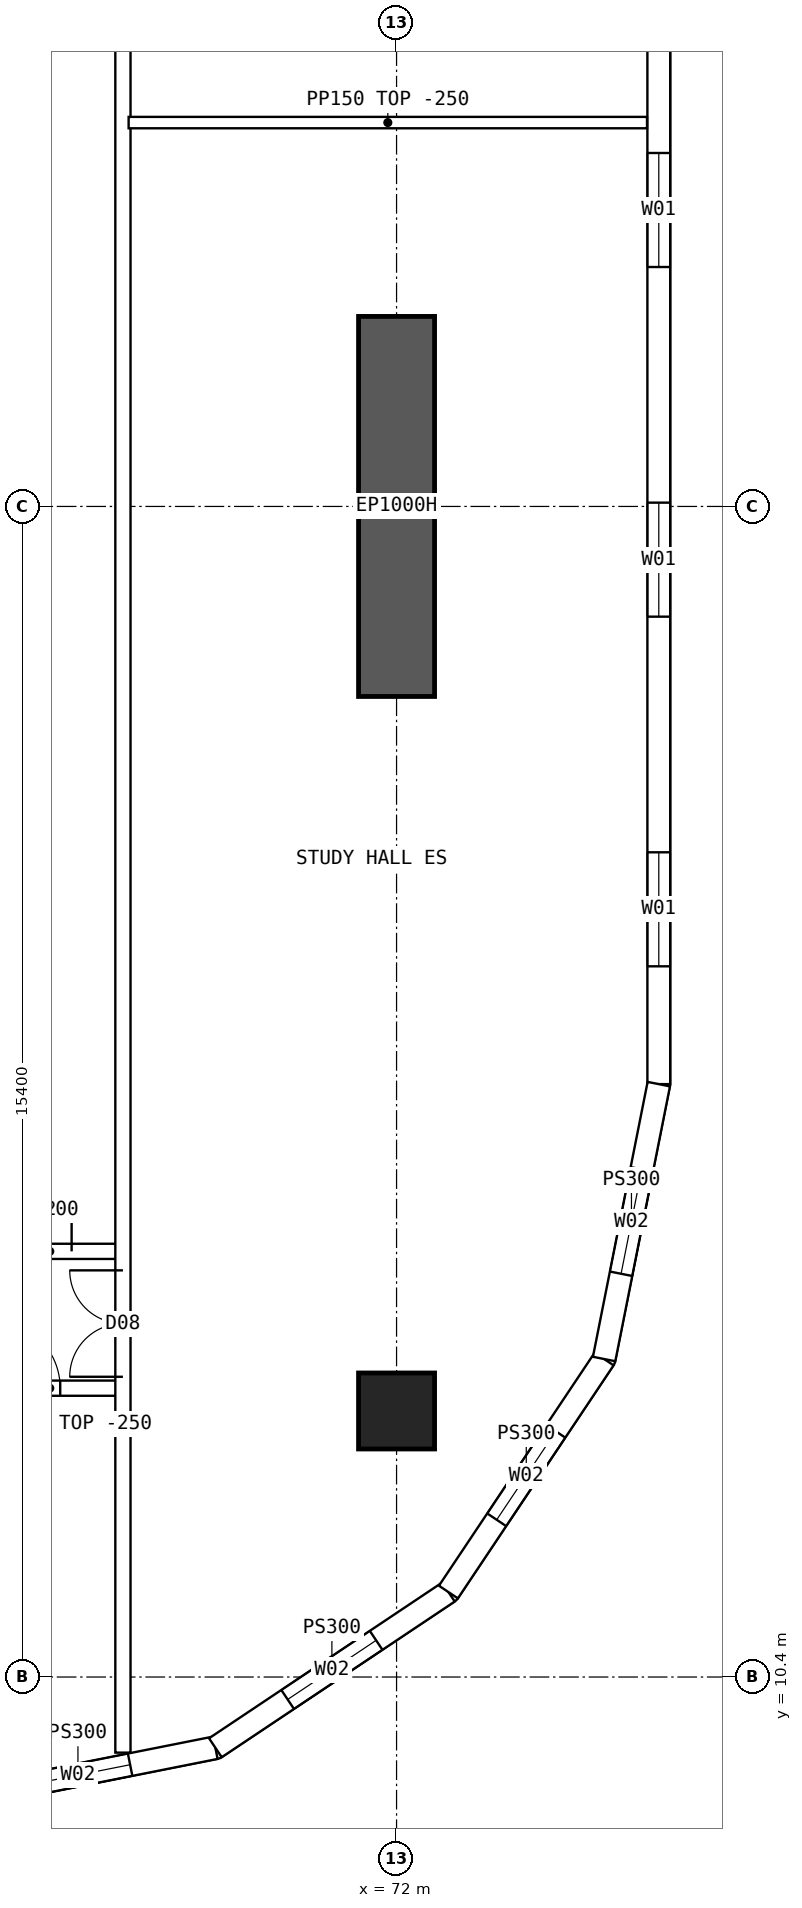
"""IFC4 building model, lengths in metres.
Left out: names, types, materials, properties, quantities, classifications, styles, units other than length and angle.
Written with IfcOpenShell. Run it as: python <this file> out.ifc"""

import sys

from ifc_helpers import new_model, si_unit, direction, frame, frame_2d, origin, origin_2d, place, context, subcontext, project, spatial, polyline, rectangle, hollow_rectangle, outline, extrude, element, fill, save


model = new_model("IFC4")
c1 = context("Model", 3, precision=1e-05, world=origin(), true_north=direction((0.0, 1.0)))
c2 = subcontext(c1, "Body", "Model", "MODEL_VIEW")
j1 = project(units=[si_unit("LENGTHUNIT", "METRE"), si_unit("PLANEANGLEUNIT", "RADIAN")], contexts=[c1])
p1 = place(None, origin())
s1 = spatial("IfcSite", under=j1, at=p1, CompositionType="ELEMENT")
p2 = place(p1, origin())
s2 = spatial("IfcBuilding", under=s1, at=p2, CompositionType="ELEMENT")
p3 = place(p2, frame((0.0, 0.0, 88.15)))
s3 = spatial("IfcBuildingStorey", under=s2, at=p3, CompositionType="ELEMENT", Elevation=88.15)
p4 = place(p3, frame((72.0, 13.9, 0.0), z_axis=(0.0, 0.0, 1.0), x_axis=(1.0, 0.0, 0.0)))
e1 = element("IfcColumn", 1, at=p4, inside=s3, PredefinedType="COLUMN", context=c2, shape_type="SweptSolid", body=[
    extrude(hollow_rectangle(XDim=1.0, YDim=1.0, WallThickness=0.1, at=origin_2d()), origin(), (0.0, 0.0, 1.0), 3.75),
])
p5 = place(p3, frame((72.0, 23.3, 0.0), z_axis=(0.0, 0.0, 1.0), x_axis=(0.0, 1.0, 0.0)))
e2 = element("IfcWall", 2, at=p5, inside=s3, PredefinedType="SHEAR", context=c2, shape_type="SweptSolid", body=[
    extrude(rectangle(XDim=5.0, YDim=1.0, at=frame_2d((2.5, 0.0))), origin(), (0.0, 0.0, 1.0), 3.75),
])
p6 = place(p3, frame((75.45, 18.2, 0.0), z_axis=(0.0, 0.0, 1.0), x_axis=(0.0, 1.0, 0.0)))
e3 = element("IfcWall", 3, at=p6, inside=s3, PredefinedType="SOLIDWALL", context=c2, shape_type="SweptSolid", body=[
    extrude(outline(polyline([(-0.015, -0.15), (27.615, -0.15), (27.585, 0.15), (0.015, 0.15), (-0.015, -0.15)])), origin(), (0.0, 0.0, 1.0), 3.5),
])
p7 = place(p6, frame((1.55, 0.0, 0.9)))
e4 = element("IfcOpeningElement", 4, at=p7, cuts=e3, PredefinedType="OPENING", context=c2, shape_type="SweptSolid", body=[
    extrude(rectangle(XDim=1.5, YDim=2.0, at=frame_2d((0.75, 1.0))), frame((0.0, 0.16, 0.0), z_axis=(0.0, -1.0, 0.0), x_axis=(1.0, 0.0, 0.0)), (0.0, 0.0, 1.0), 0.32),
])
p8 = place(p6, frame((6.15, 0.0, 0.9)))
e5 = element("IfcOpeningElement", 5, at=p8, cuts=e3, PredefinedType="OPENING", context=c2, shape_type="SweptSolid", body=[
    extrude(rectangle(XDim=1.5, YDim=2.0, at=frame_2d((0.75, 1.0))), frame((0.0, 0.16, 0.0), z_axis=(0.0, -1.0, 0.0), x_axis=(1.0, 0.0, 0.0)), (0.0, 0.0, 1.0), 0.32),
])
p9 = place(p6, frame((10.75, 0.0, 0.9)))
e6 = element("IfcOpeningElement", 6, at=p9, cuts=e3, PredefinedType="OPENING", context=c2, shape_type="SweptSolid", body=[
    extrude(rectangle(XDim=1.5, YDim=2.0, at=frame_2d((0.75, 1.0))), frame((0.0, 0.16, 0.0), z_axis=(0.0, -1.0, 0.0), x_axis=(1.0, 0.0, 0.0)), (0.0, 0.0, 1.0), 0.32),
])
p10 = place(p6, frame((15.35, 0.0, 0.9)))
e7 = element("IfcOpeningElement", 7, at=p10, cuts=e3, PredefinedType="OPENING", context=c2, shape_type="SweptSolid", body=[
    extrude(rectangle(XDim=1.5, YDim=2.0, at=frame_2d((0.75, 1.0))), frame((0.0, 0.16, 0.0), z_axis=(0.0, -1.0, 0.0), x_axis=(1.0, 0.0, 0.0)), (0.0, 0.0, 1.0), 0.32),
])
p11 = place(p6, frame((19.95, 0.0, 0.9)))
e8 = element("IfcOpeningElement", 8, at=p11, cuts=e3, PredefinedType="OPENING", context=c2, shape_type="SweptSolid", body=[
    extrude(rectangle(XDim=1.5, YDim=2.0, at=frame_2d((0.75, 1.0))), frame((0.0, 0.16, 0.0), z_axis=(0.0, -1.0, 0.0), x_axis=(1.0, 0.0, 0.0)), (0.0, 0.0, 1.0), 0.32),
])
p12 = place(p6, frame((24.55, 0.0, 0.9)))
e9 = element("IfcOpeningElement", 9, at=p12, cuts=e3, PredefinedType="OPENING", context=c2, shape_type="SweptSolid", body=[
    extrude(rectangle(XDim=1.5, YDim=2.0, at=frame_2d((0.75, 1.0))), frame((0.0, 0.16, 0.0), z_axis=(0.0, -1.0, 0.0), x_axis=(1.0, 0.0, 0.0)), (0.0, 0.0, 1.0), 0.32),
])
p13 = place(p3, frame((66.0, 8.75, 0.0), z_axis=(0.0, 0.0, 1.0), x_axis=(0.980791473772, 0.195059183267, 0.0)))
e10 = element("IfcWall", 10, at=p13, inside=s3, PredefinedType="SOLIDWALL", context=c2, shape_type="SweptSolid", body=[
    extrude(outline(polyline([(-0.03, -0.15), (3.717, -0.15), (3.657, 0.15), (0.03, 0.15), (-0.03, -0.15)])), origin(), (0.0, 0.0, 1.0), 3.5),
])
p14 = place(p13, frame((1.144, 0.0, 0.9)))
e11 = element("IfcOpeningElement", 11, at=p14, cuts=e10, PredefinedType="OPENING", context=c2, shape_type="SweptSolid", body=[
    extrude(rectangle(XDim=1.4, YDim=1.8, at=frame_2d((0.7, 0.9))), frame((0.0, 0.16, 0.0), z_axis=(0.0, -1.0, 0.0), x_axis=(1.0, 0.0, 0.0)), (0.0, 0.0, 1.0), 0.32),
])
p15 = place(p3, frame((69.616, 9.469, 0.0), z_axis=(0.0, 0.0, 1.0), x_axis=(0.831448786846, 0.555601399253, 0.0)))
e12 = element("IfcWall", 12, at=p15, inside=s3, PredefinedType="SOLIDWALL", context=c2, shape_type="SweptSolid", body=[
    extrude(outline(polyline([(-0.03, -0.15), (3.717, -0.15), (3.657, 0.15), (0.03, 0.15), (-0.03, -0.15)])), origin(), (0.0, 0.0, 1.0), 3.5),
])
p16 = place(p15, frame((1.144, 0.0, 0.9)))
e13 = element("IfcOpeningElement", 13, at=p16, cuts=e12, PredefinedType="OPENING", context=c2, shape_type="SweptSolid", body=[
    extrude(rectangle(XDim=1.4, YDim=1.8, at=frame_2d((0.7, 0.9))), frame((0.0, 0.16, 0.0), z_axis=(0.0, -1.0, 0.0), x_axis=(1.0, 0.0, 0.0)), (0.0, 0.0, 1.0), 0.32),
])
p17 = place(p3, frame((72.682, 11.518, 0.0), z_axis=(0.0, 0.0, 1.0), x_axis=(0.555601399253, 0.831448786846, 0.0)))
e14 = element("IfcWall", 14, at=p17, inside=s3, PredefinedType="SOLIDWALL", context=c2, shape_type="SweptSolid", body=[
    extrude(outline(polyline([(-0.03, -0.15), (3.717, -0.15), (3.657, 0.15), (0.03, 0.15), (-0.03, -0.15)])), origin(), (0.0, 0.0, 1.0), 3.5),
])
p18 = place(p17, frame((1.144, 0.0, 0.9)))
e15 = element("IfcOpeningElement", 15, at=p18, cuts=e14, PredefinedType="OPENING", context=c2, shape_type="SweptSolid", body=[
    extrude(rectangle(XDim=1.4, YDim=1.8, at=frame_2d((0.7, 0.9))), frame((0.0, 0.16, 0.0), z_axis=(0.0, -1.0, 0.0), x_axis=(1.0, 0.0, 0.0)), (0.0, 0.0, 1.0), 0.32),
])
p19 = place(p3, frame((74.731, 14.583, 0.0), z_axis=(0.0, 0.0, 1.0), x_axis=(0.195059183267, 0.980791473772, 0.0)))
e16 = element("IfcWall", 16, at=p19, inside=s3, PredefinedType="SOLIDWALL", context=c2, shape_type="SweptSolid", body=[
    extrude(outline(polyline([(-0.03, -0.15), (3.702, -0.15), (3.672, 0.15), (0.03, 0.15), (-0.03, -0.15)])), origin(), (0.0, 0.0, 1.0), 3.5),
])
p20 = place(p19, frame((1.144, 0.0, 0.9)))
e17 = element("IfcOpeningElement", 17, at=p20, cuts=e16, PredefinedType="OPENING", context=c2, shape_type="SweptSolid", body=[
    extrude(rectangle(XDim=1.4, YDim=1.8, at=frame_2d((0.7, 0.9))), frame((0.0, 0.16, 0.0), z_axis=(0.0, -1.0, 0.0), x_axis=(1.0, 0.0, 0.0)), (0.0, 0.0, 1.0), 0.32),
])
p21 = place(p3, frame((66.475, 14.2, 0.0), z_axis=(0.0, 0.0, 1.0), x_axis=(1.0, 0.0, 0.0)))
e18 = element("IfcWall", 18, at=p21, inside=s3, PredefinedType="SOLIDWALL", context=c2, shape_type="SweptSolid", body=[
    extrude(rectangle(XDim=1.925, YDim=0.2, at=frame_2d((0.962, 0.0))), origin(), (0.0, 0.0, 1.0), 3.5),
])
p22 = place(p21, frame((0.2, 0.0, 0.0)))
e19 = element("IfcOpeningElement", 19, at=p22, cuts=e18, PredefinedType="OPENING", context=c2, shape_type="SweptSolid", body=[
    extrude(rectangle(XDim=0.9, YDim=2.1, at=frame_2d((0.45, 1.05))), frame((0.0, 0.11, 0.0), z_axis=(0.0, -1.0, 0.0), x_axis=(1.0, 0.0, 0.0)), (0.0, 0.0, 1.0), 0.22),
])
p23 = place(p3, frame((66.475, 16.0, 0.0), z_axis=(0.0, 0.0, 1.0), x_axis=(1.0, 0.0, 0.0)))
e20 = element("IfcWall", 20, at=p23, inside=s3, PredefinedType="SOLIDWALL", context=c2, shape_type="SweptSolid", body=[
    extrude(rectangle(XDim=1.925, YDim=0.2, at=frame_2d((0.962, 0.0))), origin(), (0.0, 0.0, 1.0), 3.5),
])
p24 = place(p23, frame((0.05, 0.0, 0.0)))
e21 = element("IfcOpeningElement", 21, at=p24, cuts=e20, PredefinedType="OPENING", context=c2, shape_type="SweptSolid", body=[
    extrude(rectangle(XDim=1.2, YDim=2.1, at=frame_2d((0.6, 1.05))), frame((0.0, 0.11, 0.0), z_axis=(0.0, -1.0, 0.0), x_axis=(1.0, 0.0, 0.0)), (0.0, 0.0, 1.0), 0.22),
])
p25 = place(p3, frame((68.475, 30.85, 0.0), z_axis=(0.0, 0.0, 1.0), x_axis=(1.0, 0.0, 0.0)))
e22 = element("IfcWall", 22, at=p25, inside=s3, PredefinedType="PARTITIONING", context=c2, shape_type="SweptSolid", body=[
    extrude(outline(polyline([(0.0, 0.0), (6.82, 0.0), (6.82, 3.5), (3.827, 3.5), (3.825, 3.05), (3.227, 3.05), (3.225, 3.5), (0.0, 3.5), (0.0, 0.0)])), frame((0.0, 0.075, 0.0), z_axis=(0.0, -1.0, 0.0), x_axis=(1.0, 0.0, 0.0)), (0.0, 0.0, 1.0), 0.15),
])
p26 = place(p3, frame((68.4, 9.405, 0.0), z_axis=(0.0, 0.0, 1.0), x_axis=(0.0, 1.0, 0.0)))
e23 = element("IfcWall", 23, at=p26, inside=s3, PredefinedType="SOLIDWALL", context=c2, shape_type="SweptSolid", body=[
    extrude(rectangle(XDim=45.189, YDim=0.2, at=frame_2d((22.595, 0.0))), origin(), (0.0, 0.0, 1.0), 3.5),
])
p27 = place(p26, frame((30.195, 0.0, 0.0)))
e24 = element("IfcOpeningElement", 24, at=p27, cuts=e23, PredefinedType="OPENING", context=c2, shape_type="SweptSolid", body=[
    extrude(rectangle(XDim=1.2, YDim=2.1, at=frame_2d((0.6, 1.05))), frame((0.0, 0.11, 0.0), z_axis=(0.0, -1.0, 0.0), x_axis=(1.0, 0.0, 0.0)), (0.0, 0.0, 1.0), 0.22),
])
p28 = place(p26, frame((4.945, 0.0, 0.0)))
e25 = element("IfcOpeningElement", 25, at=p28, cuts=e23, PredefinedType="OPENING", context=c2, shape_type="SweptSolid", body=[
    extrude(rectangle(XDim=1.4, YDim=2.1, at=frame_2d((0.7, 1.05))), frame((0.0, 0.11, 0.0), z_axis=(0.0, -1.0, 0.0), x_axis=(1.0, 0.0, 0.0)), (0.0, 0.0, 1.0), 0.22),
])
p29 = place(p26, frame((38.745, 0.0, 0.0)))
e26 = element("IfcOpeningElement", 26, at=p29, cuts=e23, PredefinedType="OPENING", context=c2, shape_type="SweptSolid", body=[
    extrude(rectangle(XDim=1.4, YDim=2.1, at=frame_2d((0.7, 1.05))), frame((0.0, 0.11, 0.0), z_axis=(0.0, -1.0, 0.0), x_axis=(1.0, 0.0, 0.0)), (0.0, 0.0, 1.0), 0.22),
])
p30 = place(p7, origin())
e27 = element("IfcWindow", 27, at=p30, inside=s3, PartitioningType="SINGLE_PANEL", PredefinedType="WINDOW", context=c2, shape_type="SweptSolid", body=[
    extrude(rectangle(XDim=1.5, YDim=2.0, at=frame_2d((0.75, 1.0))), frame((0.0, 0.03, 0.0), z_axis=(0.0, -1.0, 0.0), x_axis=(1.0, 0.0, 0.0)), (0.0, 0.0, 1.0), 0.06),
])
fill(e4, e27)
p31 = place(p8, origin())
e28 = element("IfcWindow", 28, at=p31, inside=s3, PartitioningType="SINGLE_PANEL", PredefinedType="WINDOW", context=c2, shape_type="SweptSolid", body=[
    extrude(rectangle(XDim=1.5, YDim=2.0, at=frame_2d((0.75, 1.0))), frame((0.0, 0.03, 0.0), z_axis=(0.0, -1.0, 0.0), x_axis=(1.0, 0.0, 0.0)), (0.0, 0.0, 1.0), 0.06),
])
fill(e5, e28)
p32 = place(p9, origin())
e29 = element("IfcWindow", 29, at=p32, inside=s3, PartitioningType="SINGLE_PANEL", PredefinedType="WINDOW", context=c2, shape_type="SweptSolid", body=[
    extrude(rectangle(XDim=1.5, YDim=2.0, at=frame_2d((0.75, 1.0))), frame((0.0, 0.03, 0.0), z_axis=(0.0, -1.0, 0.0), x_axis=(1.0, 0.0, 0.0)), (0.0, 0.0, 1.0), 0.06),
])
fill(e6, e29)
p33 = place(p14, origin())
e30 = element("IfcWindow", 30, at=p33, inside=s3, PartitioningType="SINGLE_PANEL", PredefinedType="WINDOW", context=c2, shape_type="SweptSolid", body=[
    extrude(rectangle(XDim=1.4, YDim=1.8, at=frame_2d((0.7, 0.9))), frame((0.0, 0.03, 0.0), z_axis=(0.0, -1.0, 0.0), x_axis=(1.0, 0.0, 0.0)), (0.0, 0.0, 1.0), 0.06),
])
fill(e11, e30)
p34 = place(p16, origin())
e31 = element("IfcWindow", 31, at=p34, inside=s3, PartitioningType="SINGLE_PANEL", PredefinedType="WINDOW", context=c2, shape_type="SweptSolid", body=[
    extrude(rectangle(XDim=1.4, YDim=1.8, at=frame_2d((0.7, 0.9))), frame((0.0, 0.03, 0.0), z_axis=(0.0, -1.0, 0.0), x_axis=(1.0, 0.0, 0.0)), (0.0, 0.0, 1.0), 0.06),
])
fill(e13, e31)
p35 = place(p18, origin())
e32 = element("IfcWindow", 32, at=p35, inside=s3, PartitioningType="SINGLE_PANEL", PredefinedType="WINDOW", context=c2, shape_type="SweptSolid", body=[
    extrude(rectangle(XDim=1.4, YDim=1.8, at=frame_2d((0.7, 0.9))), frame((0.0, 0.03, 0.0), z_axis=(0.0, -1.0, 0.0), x_axis=(1.0, 0.0, 0.0)), (0.0, 0.0, 1.0), 0.06),
])
fill(e15, e32)
p36 = place(p20, origin())
e33 = element("IfcWindow", 33, at=p36, inside=s3, PartitioningType="SINGLE_PANEL", PredefinedType="WINDOW", context=c2, shape_type="SweptSolid", body=[
    extrude(rectangle(XDim=1.4, YDim=1.8, at=frame_2d((0.7, 0.9))), frame((0.0, 0.03, 0.0), z_axis=(0.0, -1.0, 0.0), x_axis=(1.0, 0.0, 0.0)), (0.0, 0.0, 1.0), 0.06),
])
fill(e17, e33)
p37 = place(p24, origin())
e34 = element("IfcDoor", 34, at=p37, inside=s3, OperationType="DOUBLE_DOOR_SINGLE_SWING", PredefinedType="DOOR", context=c2, shape_type="SweptSolid", body=[
    extrude(rectangle(XDim=1.2, YDim=2.1, at=frame_2d((0.6, 1.05))), frame((0.0, 0.025, 0.0), z_axis=(0.0, -1.0, 0.0), x_axis=(1.0, 0.0, 0.0)), (0.0, 0.0, 1.0), 0.05),
])
fill(e21, e34)
p38 = place(p28, origin())
e35 = element("IfcDoor", 35, at=p38, inside=s3, OperationType="DOUBLE_DOOR_SINGLE_SWING", PredefinedType="DOOR", context=c2, shape_type="SweptSolid", body=[
    extrude(rectangle(XDim=1.4, YDim=2.1, at=frame_2d((0.7, 1.05))), frame((0.0, 0.025, 0.0), z_axis=(0.0, -1.0, 0.0), x_axis=(1.0, 0.0, 0.0)), (0.0, 0.0, 1.0), 0.05),
])
fill(e25, e35)
p39 = place(p22, origin())
e36 = element("IfcDoor", 36, at=p39, inside=s3, OperationType="SINGLE_SWING_LEFT", PredefinedType="DOOR", context=c2, shape_type="SweptSolid", body=[
    extrude(rectangle(XDim=0.9, YDim=2.1, at=frame_2d((0.45, 1.05))), frame((0.0, 0.025, 0.0), z_axis=(0.0, -1.0, 0.0), x_axis=(1.0, 0.0, 0.0)), (0.0, 0.0, 1.0), 0.05),
])
fill(e19, e36)
save(model, sys.argv[1])
